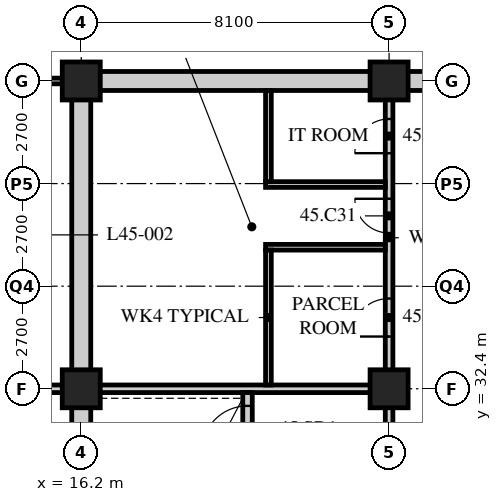
"""IFC4 building model, lengths in metres.
Left out: names, types, materials, properties, quantities, classifications, styles, units other than length and angle.
Written with IfcOpenShell. Run it as: python <this file> out.ifc"""

import sys

from ifc_helpers import new_model, si_unit, direction, frame, frame_2d, origin, origin_2d, place, context, subcontext, project, spatial, rectangle, hollow_rectangle, extrude, element, fill, save


model = new_model("IFC4")
c1 = context("Model", 3, precision=1e-05, world=origin(), true_north=direction((0.0, 1.0)))
c2 = subcontext(c1, "Body", "Model", "MODEL_VIEW")
j1 = project(units=[si_unit("LENGTHUNIT", "METRE"), si_unit("PLANEANGLEUNIT", "RADIAN")], contexts=[c1])
p1 = place(None, origin())
s1 = spatial("IfcSite", under=j1, at=p1, CompositionType="ELEMENT")
p2 = place(p1, origin())
s2 = spatial("IfcBuilding", under=s1, at=p2, CompositionType="ELEMENT")
p3 = place(p2, frame((0.0, 0.0, 177.6)))
s3 = spatial("IfcBuildingStorey", under=s2, at=p3, CompositionType="ELEMENT", Elevation=177.6)
for number, where, z_axis, x_axis in (
    (1, (16.2, 32.4, 0.0), (0.0, 0.0, 1.0), (1.0, 0.0, 0.0)),
    (2, (16.2, 40.5, 0.0), (0.0, 0.0, 1.0), (1.0, 0.0, 0.0)),
    (3, (24.3, 32.4, 0.0), (0.0, 0.0, 1.0), (1.0, 0.0, 0.0)),
    (4, (24.3, 40.5, 0.0), (0.0, 0.0, 1.0), (1.0, 0.0, 0.0)),
):
    element("IfcColumn", number, at=place(p3, frame(where, z_axis=z_axis, x_axis=x_axis)), inside=s3, PredefinedType="COLUMN", context=c2, shape_type="SweptSolid", body=[
        extrude(hollow_rectangle(XDim=1.0, YDim=1.0, WallThickness=0.1, at=origin_2d()), origin(), (0.0, 0.0, 1.0), 3.6),
    ])
p4 = place(p3, frame((16.0, 40.5, 0.0), z_axis=(0.0, 0.0, 1.0), x_axis=(-1.0, 0.0, 0.0)))
e5 = element("IfcWall", 5, at=p4, inside=s3, PredefinedType="PARTITIONING", context=c2, shape_type="SweptSolid", body=[
    extrude(rectangle(XDim=2.05, YDim=0.15, at=frame_2d((1.025, 0.0))), origin(), (0.0, 0.0, 1.0), 3.39),
])
p5 = place(p3, frame((13.95, 32.4, 0.0), z_axis=(0.0, 0.0, 1.0), x_axis=(1.0, 0.0, 0.0)))
e6 = element("IfcWall", 6, at=p5, inside=s3, PredefinedType="SOLIDWALL", context=c2, shape_type="SweptSolid", body=[
    extrude(rectangle(XDim=2.25, YDim=0.2, at=frame_2d((1.125, 0.0))), origin(), (0.0, 0.0, 1.0), 3.39),
])
p6 = place(p3, frame((15.95, 40.5, 0.0), z_axis=(0.0, 0.0, 1.0), x_axis=(1.0, 0.0, 0.0)))
e7 = element("IfcWall", 7, at=p6, inside=s3, PredefinedType="SOLIDWALL", context=c2, shape_type="SweptSolid", body=[
    extrude(rectangle(XDim=24.8, YDim=0.5, at=frame_2d((12.4, 0.0))), origin(), (0.0, 0.0, 1.0), 2.74),
])
p7 = place(p6, frame((11.5, 0.0, 0.0)))
e8 = element("IfcOpeningElement", 8, at=p7, cuts=e7, PredefinedType="OPENING", context=c2, shape_type="SweptSolid", body=[
    extrude(rectangle(XDim=1.8, YDim=2.4, at=frame_2d((0.9, 1.2))), frame((0.0, 0.26, 0.0), z_axis=(0.0, -1.0, 0.0), x_axis=(1.0, 0.0, 0.0)), (0.0, 0.0, 1.0), 0.52),
])
p8 = place(p3, frame((16.2, 24.55, 0.0), z_axis=(0.0, 0.0, 1.0), x_axis=(0.0, 1.0, 0.0)))
e9 = element("IfcWall", 9, at=p8, inside=s3, PredefinedType="SOLIDWALL", context=c2, shape_type="SweptSolid", body=[
    extrude(rectangle(XDim=15.7, YDim=0.5, at=frame_2d((7.85, 0.0))), origin(), (0.0, 0.0, 1.0), 2.778),
])
p9 = place(p3, frame((16.45, 32.4, 0.0), z_axis=(0.0, 0.0, 1.0), x_axis=(1.0, 0.0, 0.0)))
e10 = element("IfcWall", 10, at=p9, inside=s3, PredefinedType="SOLIDWALL", context=c2, shape_type="SweptSolid", body=[
    extrude(rectangle(XDim=7.95, YDim=0.2, at=frame_2d((3.975, 0.0))), origin(), (0.0, 0.0, 1.0), 2.778),
])
p10 = place(p3, frame((24.3, 24.55, 0.0), z_axis=(0.0, 0.0, 1.0), x_axis=(0.0, 1.0, 0.0)))
e11 = element("IfcWall", 11, at=p10, inside=s3, PredefinedType="SOLIDWALL", context=c2, shape_type="SweptSolid", body=[
    extrude(rectangle(XDim=7.75, YDim=0.2, at=frame_2d((3.875, 0.0))), origin(), (0.0, 0.0, 1.0), 2.778),
])
p11 = place(p10, frame((4.6, 0.0, 0.0)))
e12 = element("IfcOpeningElement", 12, at=p11, cuts=e11, PredefinedType="OPENING", context=c2, shape_type="SweptSolid", body=[
    extrude(rectangle(XDim=1.2, YDim=2.1, at=frame_2d((0.6, 1.05))), frame((0.0, 0.11, 0.0), z_axis=(0.0, -1.0, 0.0), x_axis=(1.0, 0.0, 0.0)), (0.0, 0.0, 1.0), 0.22),
])
p12 = place(p3, frame((20.575, 24.55, 0.0), z_axis=(0.0, 0.0, 1.0), x_axis=(0.0, 1.0, 0.0)))
e13 = element("IfcWall", 13, at=p12, inside=s3, PredefinedType="SOLIDWALL", context=c2, shape_type="SweptSolid", body=[
    extrude(rectangle(XDim=7.75, YDim=0.25, at=frame_2d((3.875, 0.0))), origin(), (0.0, 0.0, 1.0), 3.39),
])
p13 = place(p12, frame((6.2, 0.0, 0.0)))
e14 = element("IfcOpeningElement", 14, at=p13, cuts=e13, PredefinedType="OPENING", context=c2, shape_type="SweptSolid", body=[
    extrude(rectangle(XDim=1.2, YDim=2.1, at=frame_2d((0.6, 1.05))), frame((0.0, 0.135, 0.0), z_axis=(0.0, -1.0, 0.0), x_axis=(1.0, 0.0, 0.0)), (0.0, 0.0, 1.0), 0.27),
])
p14 = place(p3, frame((24.3, 32.5, 0.0), z_axis=(0.0, 0.0, 1.0), x_axis=(0.0, 1.0, 0.0)))
e15 = element("IfcWall", 15, at=p14, inside=s3, PredefinedType="PARTITIONING", context=c2, shape_type="SweptSolid", body=[
    extrude(rectangle(XDim=7.75, YDim=0.2, at=frame_2d((3.875, 0.0))), origin(), (0.0, 0.0, 1.0), 2.778),
])
p15 = place(p14, frame((1.275, 0.0, 0.0)))
e16 = element("IfcOpeningElement", 16, at=p15, cuts=e15, PredefinedType="OPENING", context=c2, shape_type="SweptSolid", body=[
    extrude(rectangle(XDim=1.0, YDim=2.1, at=frame_2d((0.5, 1.05))), frame((0.0, 0.11, 0.0), z_axis=(0.0, -1.0, 0.0), x_axis=(1.0, 0.0, 0.0)), (0.0, 0.0, 1.0), 0.22),
])
p16 = place(p14, frame((4.0, 0.0, 0.0)))
e17 = element("IfcOpeningElement", 17, at=p16, cuts=e15, PredefinedType="OPENING", context=c2, shape_type="SweptSolid", body=[
    extrude(rectangle(XDim=0.9, YDim=2.1, at=frame_2d((0.45, 1.05))), frame((0.0, 0.11, 0.0), z_axis=(0.0, -1.0, 0.0), x_axis=(1.0, 0.0, 0.0)), (0.0, 0.0, 1.0), 0.22),
])
p17 = place(p14, frame((6.1, 0.0, 0.0)))
e18 = element("IfcOpeningElement", 18, at=p17, cuts=e15, PredefinedType="OPENING", context=c2, shape_type="SweptSolid", body=[
    extrude(rectangle(XDim=0.9, YDim=2.1, at=frame_2d((0.45, 1.05))), frame((0.0, 0.11, 0.0), z_axis=(0.0, -1.0, 0.0), x_axis=(1.0, 0.0, 0.0)), (0.0, 0.0, 1.0), 0.22),
])
for number, where, z_axis, x_axis in (
    (19, (21.05, 36.125, 0.0), (0.0, 0.0, 1.0), (1.0, 0.0, 0.0)),
    (20, (21.05, 37.775, 0.0), (0.0, 0.0, 1.0), (1.0, 0.0, 0.0)),
):
    element("IfcWall", number, at=place(p3, frame(where, z_axis=z_axis, x_axis=x_axis)), inside=s3, PredefinedType="PARTITIONING", context=c2, shape_type="SweptSolid", body=[
        extrude(rectangle(XDim=3.15, YDim=0.15, at=frame_2d((1.575, 0.0))), origin(), (0.0, 0.0, 1.0), 3.39),
    ])
p18 = place(p3, frame((21.125, 32.5, 0.0), z_axis=(0.0, 0.0, 1.0), x_axis=(0.0, 1.0, 0.0)))
e21 = element("IfcWall", 21, at=p18, inside=s3, PredefinedType="PARTITIONING", context=c2, shape_type="SweptSolid", body=[
    extrude(rectangle(XDim=3.55, YDim=0.15, at=frame_2d((1.775, 0.0))), origin(), (0.0, 0.0, 1.0), 3.39),
])
p19 = place(p3, frame((21.125, 37.85, 0.0), z_axis=(0.0, 0.0, 1.0), x_axis=(0.0, 1.0, 0.0)))
e22 = element("IfcWall", 22, at=p19, inside=s3, PredefinedType="PARTITIONING", context=c2, shape_type="SweptSolid", body=[
    extrude(rectangle(XDim=2.4, YDim=0.15, at=frame_2d((1.2, 0.0))), origin(), (0.0, 0.0, 1.0), 3.39),
])
p20 = place(p15, origin())
e23 = element("IfcDoor", 23, at=p20, inside=s3, OperationType="SINGLE_SWING_LEFT", PredefinedType="DOOR", context=c2, shape_type="SweptSolid", body=[
    extrude(rectangle(XDim=1.0, YDim=2.1, at=frame_2d((0.5, 1.05))), frame((0.0, 0.025, 0.0), z_axis=(0.0, -1.0, 0.0), x_axis=(1.0, 0.0, 0.0)), (0.0, 0.0, 1.0), 0.05),
])
fill(e16, e23)
p21 = place(p16, origin())
e24 = element("IfcDoor", 24, at=p21, inside=s3, OperationType="SINGLE_SWING_RIGHT", PredefinedType="DOOR", context=c2, shape_type="SweptSolid", body=[
    extrude(rectangle(XDim=0.9, YDim=2.1, at=frame_2d((0.45, 1.05))), frame((0.0, 0.025, 0.0), z_axis=(0.0, -1.0, 0.0), x_axis=(1.0, 0.0, 0.0)), (0.0, 0.0, 1.0), 0.05),
])
fill(e17, e24)
p22 = place(p17, origin())
e25 = element("IfcDoor", 25, at=p22, inside=s3, OperationType="SINGLE_SWING_LEFT", PredefinedType="DOOR", context=c2, shape_type="SweptSolid", body=[
    extrude(rectangle(XDim=0.9, YDim=2.1, at=frame_2d((0.45, 1.05))), frame((0.0, 0.025, 0.0), z_axis=(0.0, -1.0, 0.0), x_axis=(1.0, 0.0, 0.0)), (0.0, 0.0, 1.0), 0.05),
])
fill(e18, e25)
p23 = place(p13, origin())
e26 = element("IfcDoor", 26, at=p23, inside=s3, OperationType="SINGLE_SWING_LEFT", PredefinedType="DOOR", context=c2, shape_type="SweptSolid", body=[
    extrude(rectangle(XDim=1.2, YDim=2.1, at=frame_2d((0.6, 1.05))), frame((0.0, 0.025, 0.0), z_axis=(0.0, -1.0, 0.0), x_axis=(1.0, 0.0, 0.0)), (0.0, 0.0, 1.0), 0.05),
])
fill(e14, e26)
save(model, sys.argv[1])
